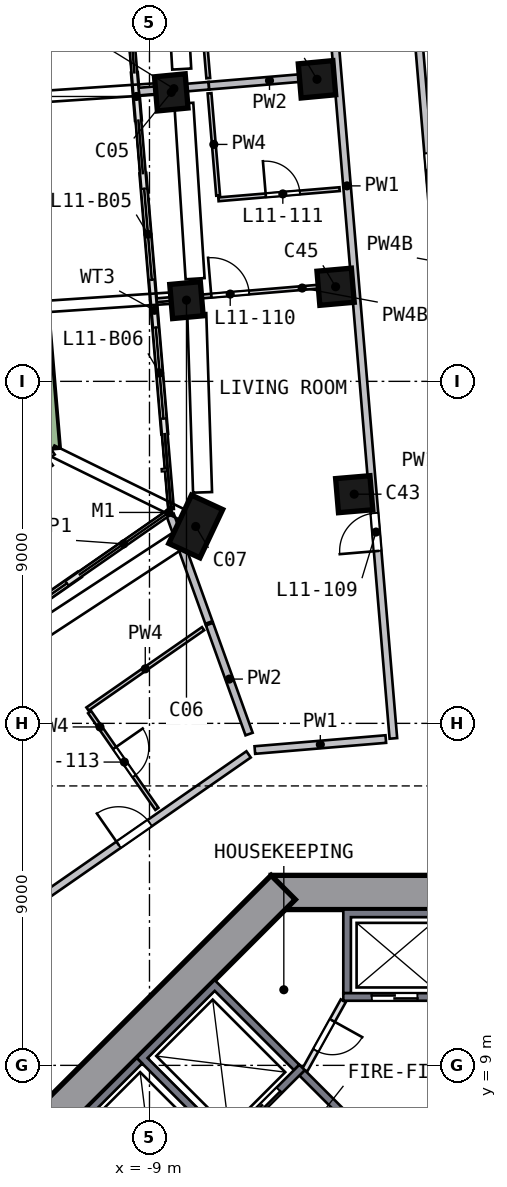
"""IFC4 building model, lengths in metres.
Left out: names, types, materials, properties, quantities, classifications, styles, units other than length and angle.
Written with IfcOpenShell. Run it as: python <this file> out.ifc"""

import sys

from ifc_helpers import new_model, si_unit, direction, frame, frame_2d, origin, origin_2d, place, context, subcontext, project, spatial, polyline, rectangle, outline, extrude, element, fill, save


model = new_model("IFC4")
c1 = context("Model", 3, precision=1e-05, world=origin(), true_north=direction((0.0, 1.0)))
c2 = subcontext(c1, "Body", "Model", "MODEL_VIEW")
j1 = project(units=[si_unit("LENGTHUNIT", "METRE"), si_unit("PLANEANGLEUNIT", "RADIAN")], contexts=[c1])
p1 = place(None, origin())
s1 = spatial("IfcSite", under=j1, at=p1, CompositionType="ELEMENT")
p2 = place(p1, origin())
s2 = spatial("IfcBuilding", under=s1, at=p2, CompositionType="ELEMENT")
p3 = place(p2, frame((0.0, 0.0, 53.0)))
s3 = spatial("IfcBuildingStorey", under=s2, at=p3, CompositionType="ELEMENT", Elevation=53.0)
p4 = place(p3, frame((-8.234, 34.713, 0.0), z_axis=(-0.158130165, -0.08896233, 0.98340254), x_axis=(0.096133876, -0.992588821, -0.074335123)))
e1 = element("IfcColumn", 1, at=p4, inside=s3, PredefinedType="COLUMN", context=c2, shape_type="SweptSolid", body=[
    extrude(rectangle(XDim=0.9, YDim=0.8, at=origin_2d()), origin(), (0.0, 0.0, 1.0), 3.244),
])
p5 = place(p3, frame((-7.862, 29.214, 0.0), z_axis=(-0.13553465, -0.062886261, 0.988774836), x_axis=(0.090521396, -0.994595555, -0.050848392)))
e2 = element("IfcColumn", 2, at=p5, inside=s3, PredefinedType="COLUMN", context=c2, shape_type="SweptSolid", body=[
    extrude(rectangle(XDim=0.9, YDim=0.8, at=origin_2d()), origin(), (0.0, 0.0, 1.0), 3.226),
])
p6 = place(p3, frame((-7.65, 23.226, 0.0), z_axis=(-0.110070907, -0.037323767, 0.9932227), x_axis=(0.417946894, 0.904913597, 0.080322951)))
e3 = element("IfcColumn", 3, at=p6, inside=s3, PredefinedType="COLUMN", context=c2, shape_type="SweptSolid", body=[
    extrude(rectangle(XDim=1.4, YDim=0.9, at=origin_2d()), origin(), (0.0, 0.0, 1.0), 3.212),
])
p7 = place(p3, frame((-3.475, 24.052, 0.0), z_axis=(-0.11418529, -0.017485098, 0.993305588), x_axis=(-0.084671563, 0.99637834, 0.007805781)))
e4 = element("IfcColumn", 4, at=p7, inside=s3, PredefinedType="COLUMN", context=c2, shape_type="SweptSolid", body=[
    extrude(rectangle(XDim=0.9, YDim=0.9, at=origin_2d()), origin(), (0.0, 0.0, 1.0), 3.211),
])
p8 = place(p3, frame((-3.936, 29.543, 0.0), z_axis=(-0.137379171, -0.044379379, 0.989523842), x_axis=(-0.088152159, 0.995579543, 0.03241249)))
e5 = element("IfcColumn", 5, at=p8, inside=s3, PredefinedType="COLUMN", context=c2, shape_type="SweptSolid", body=[
    extrude(rectangle(XDim=0.9, YDim=0.9, at=origin_2d()), origin(), (0.0, 0.0, 1.0), 3.224),
])
p9 = place(p3, frame((-0.862, 35.332, 0.0), z_axis=(-0.161759103, -0.054296762, 0.985335402), x_axis=(-0.089864726, 0.995147, 0.040084647)))
e6 = element("IfcColumn", 6, at=p9, inside=s3, PredefinedType="COLUMN", context=c2, shape_type="SweptSolid", body=[
    extrude(rectangle(XDim=0.9, YDim=0.9, at=origin_2d()), origin(), (0.0, 0.0, 1.0), 3.237),
])
p10 = place(p3, frame((-4.397, 35.035, 0.0), z_axis=(-0.159975814, -0.070907791, 0.984570883), x_axis=(-0.092819779, 0.99407797, 0.056510866)))
e7 = element("IfcColumn", 7, at=p10, inside=s3, PredefinedType="COLUMN", context=c2, shape_type="SweptSolid", body=[
    extrude(rectangle(XDim=0.9, YDim=0.9, at=origin_2d()), origin(), (0.0, 0.0, 1.0), 3.24),
])
p11 = place(p3, frame((5.799, 13.55, 0.0), z_axis=(0.0, 0.0, 1.0), x_axis=(-1.0, 0.0, 0.0)))
e8 = element("IfcWall", 8, at=p11, inside=s3, PredefinedType="SHEAR", context=c2, shape_type="SweptSolid", body=[
    extrude(rectangle(XDim=11.598, YDim=0.9, at=frame_2d((5.799, 0.0))), origin(), (0.0, 0.0, 1.0), 3.5),
])
p12 = place(p11, frame((4.899, 0.0, 0.0)))
e9 = element("IfcOpeningElement", 9, at=p12, cuts=e8, PredefinedType="OPENING", context=c2, shape_type="SweptSolid", body=[
    extrude(rectangle(XDim=1.8, YDim=2.1, at=frame_2d((0.9, 1.05))), frame((0.0, 0.46, 0.0), z_axis=(0.0, -1.0, 0.0), x_axis=(1.0, 0.0, 0.0)), (0.0, 0.0, 1.0), 0.92),
])
p13 = place(p3, frame((-5.481, 13.682, 0.0), z_axis=(0.0, 0.0, 1.0), x_axis=(-0.707106781, -0.707106781, 0.0)))
e10 = element("IfcWall", 10, at=p13, inside=s3, PredefinedType="SHEAR", context=c2, shape_type="SweptSolid", body=[
    extrude(rectangle(XDim=11.598, YDim=0.9, at=frame_2d((5.799, 0.0))), origin(), (0.0, 0.0, 1.0), 3.5),
])
p14 = place(p3, frame((-9.174, 32.465, 0.0), z_axis=(0.0, 0.0, 1.0), x_axis=(0.083666706, -0.996493794, 0.0)))
e11 = element("IfcWall", 11, at=p14, inside=s3, PredefinedType="SOLIDWALL", context=c2, shape_type="SweptSolid", body=[
    extrude(rectangle(XDim=3.35, YDim=0.15, at=frame_2d((1.675, 0.0))), origin(), (0.0, 0.0, 1.0), 2.425),
])
p15 = place(p14, frame((0.4, 0.0, 0.0)))
e12 = element("IfcOpeningElement", 12, at=p15, cuts=e11, PredefinedType="OPENING", context=c2, shape_type="SweptSolid", body=[
    extrude(rectangle(XDim=2.4, YDim=2.4, at=frame_2d((1.2, 1.2))), frame((0.0, 0.085, 0.0), z_axis=(0.0, -1.0, 0.0), x_axis=(1.0, 0.0, 0.0)), (0.0, 0.0, 1.0), 0.17),
])
p16 = place(p3, frame((-8.894, 29.127, 0.0), z_axis=(0.0, 0.0, 1.0), x_axis=(0.083677625, -0.996492878, 0.0)))
e13 = element("IfcWall", 13, at=p16, inside=s3, PredefinedType="SOLIDWALL", context=c2, shape_type="SweptSolid", body=[
    extrude(rectangle(XDim=3.516, YDim=0.15, at=frame_2d((1.758, 0.0))), origin(), (0.0, 0.0, 1.0), 2.425),
])
p17 = place(p16, frame((0.716, 0.0, 0.0)))
e14 = element("IfcOpeningElement", 14, at=p17, cuts=e13, PredefinedType="OPENING", context=c2, shape_type="SweptSolid", body=[
    extrude(rectangle(XDim=2.4, YDim=2.4, at=frame_2d((1.2, 1.2))), frame((0.0, 0.085, 0.0), z_axis=(0.0, -1.0, 0.0), x_axis=(1.0, 0.0, 0.0)), (0.0, 0.0, 1.0), 0.17),
])
p18 = place(p3, frame((-9.396, 35.117, 0.0), z_axis=(0.0, 0.0, 1.0), x_axis=(0.083776122, -0.996484602, 0.0)))
e15 = element("IfcWall", 15, at=p18, inside=s3, PredefinedType="SOLIDWALL", context=c2, shape_type="SweptSolid", body=[
    extrude(rectangle(XDim=1.244, YDim=0.15, at=frame_2d((0.622, 0.0))), origin(), (0.0, 0.0, 1.0), 2.425),
])
p19 = place(p3, frame((-10.846, 21.913, 0.0), z_axis=(0.0, 0.0, 1.0), x_axis=(-0.821158084, -0.570700799, 0.0)))
e16 = element("IfcWall", 16, at=p19, inside=s3, PredefinedType="SOLIDWALL", context=c2, shape_type="SweptSolid", body=[
    extrude(rectangle(XDim=3.6, YDim=0.15, at=frame_2d((1.8, 0.0))), origin(), (0.0, 0.0, 1.0), 2.425),
])
p20 = place(p19, frame((0.4, 0.0, 0.0)))
e17 = element("IfcOpeningElement", 17, at=p20, cuts=e16, PredefinedType="OPENING", context=c2, shape_type="SweptSolid", body=[
    extrude(rectangle(XDim=2.4, YDim=2.4, at=frame_2d((1.2, 1.2))), frame((0.0, 0.085, 0.0), z_axis=(0.0, -1.0, 0.0), x_axis=(1.0, 0.0, 0.0)), (0.0, 0.0, 1.0), 0.17),
])
p21 = place(p3, frame((-12.788, 39.359, 0.0), z_axis=(0.0, 0.0, 1.0), x_axis=(0.083680733, -0.996492617, 0.0)))
e18 = element("IfcWall", 18, at=p21, inside=s3, PredefinedType="SOLIDWALL", context=c2, shape_type="SweptSolid", body=[
    extrude(rectangle(XDim=14.185, YDim=0.5, at=frame_2d((7.093, 0.0))), origin(), (0.0, 0.0, 1.0), 0.7),
])
p22 = place(p3, origin())
e19 = element("IfcWall", 19, at=p22, inside=s3, PredefinedType="SOLIDWALL", context=c2, shape_type="SweptSolid", body=[
    extrude(outline(polyline([(-3.9, 10.9), (-3.9, 13.1), (-1.2, 13.1), (-1.2, 10.9), (-1.4, 10.9), (-1.4, 12.9), (-3.7, 12.9), (-3.7, 10.9), (-3.9, 10.9)])), origin(), (0.0, 0.0, 1.0), 3.19),
])
p23 = place(p3, frame((-1.2, 10.8, 0.0), z_axis=(0.0, 0.0, 1.0), x_axis=(-1.0, 0.0, 0.0)))
e20 = element("IfcWall", 20, at=p23, inside=s3, PredefinedType="SOLIDWALL", context=c2, shape_type="SweptSolid", body=[
    extrude(rectangle(XDim=2.7, YDim=0.2, at=frame_2d((1.35, 0.0))), origin(), (0.0, 0.0, 1.0), 3.19),
])
p24 = place(p23, frame((0.75, 0.0, 0.0)))
e21 = element("IfcOpeningElement", 21, at=p24, cuts=e20, PredefinedType="OPENING", context=c2, shape_type="SweptSolid", body=[
    extrude(rectangle(XDim=1.2, YDim=2.1, at=frame_2d((0.6, 1.05))), frame((0.0, 0.11, 0.0), z_axis=(0.0, -1.0, 0.0), x_axis=(1.0, 0.0, 0.0)), (0.0, 0.0, 1.0), 0.22),
])
p25 = place(p3, origin())
e22 = element("IfcWall", 22, at=p25, inside=s3, PredefinedType="SOLIDWALL", context=c2, shape_type="SweptSolid", body=[
    extrude(outline(polyline([(-9.334, 9.192), (-7.283, 11.243), (-5.056, 9.016), (-5.197, 8.874), (-7.283, 10.96), (-9.051, 9.192), (-6.965, 7.106), (-7.106, 6.965), (-9.334, 9.192)])), origin(), (0.0, 0.0, 1.0), 3.19),
])
p26 = place(p3, frame((-4.985, 8.945, 0.0), z_axis=(0.0, 0.0, 1.0), x_axis=(-0.707106781, -0.707106781, 0.0)))
e23 = element("IfcWall", 23, at=p26, inside=s3, PredefinedType="SOLIDWALL", context=c2, shape_type="SweptSolid", body=[
    extrude(rectangle(XDim=2.9, YDim=0.2, at=frame_2d((1.45, 0.0))), origin(), (0.0, 0.0, 1.0), 3.19),
])
p27 = place(p26, frame((0.85, 0.0, 0.0)))
e24 = element("IfcOpeningElement", 24, at=p27, cuts=e23, PredefinedType="OPENING", context=c2, shape_type="SweptSolid", body=[
    extrude(rectangle(XDim=1.2, YDim=2.1, at=frame_2d((0.6, 1.05))), frame((0.0, 0.11, 0.0), z_axis=(0.0, -1.0, 0.0), x_axis=(1.0, 0.0, 0.0)), (0.0, 0.0, 1.0), 0.22),
])
p28 = place(p3, origin())
e25 = element("IfcWall", 25, at=p28, inside=s3, PredefinedType="SOLIDWALL", context=c2, shape_type="SweptSolid", body=[
    extrude(outline(polyline([(-11.243, 7.283), (-9.334, 9.192), (-9.192, 9.051), (-10.96, 7.283), (-8.874, 5.197), (-9.016, 5.056), (-11.243, 7.283)])), origin(), (0.0, 0.0, 1.0), 3.19),
])
p29 = place(p3, frame((-3.005, 6.823, 0.0), z_axis=(0.0, 0.0, 1.0), x_axis=(-0.707106781, 0.707106781, 0.0)))
e26 = element("IfcWall", 26, at=p29, inside=s3, PredefinedType="SOLIDWALL", context=c2, shape_type="SweptSolid", body=[
    extrude(rectangle(XDim=2.8, YDim=0.2, at=frame_2d((1.4, 0.0))), origin(), (0.0, 0.0, 1.0), 3.19),
])
p30 = place(p3, frame((-3.9, 10.7, 0.0), z_axis=(0.0, 0.0, 1.0), x_axis=(-0.485692555, -0.874129705, 0.0)))
e27 = element("IfcWall", 27, at=p30, inside=s3, PredefinedType="PARTITIONING", context=c2, shape_type="SweptSolid", body=[
    extrude(rectangle(XDim=2.089, YDim=0.15, at=frame_2d((1.044, 0.0))), origin(), (0.0, 0.0, 1.0), 3.19),
])
p31 = place(p30, frame((0.594, 0.0, 0.0)))
e28 = element("IfcOpeningElement", 28, at=p31, cuts=e27, PredefinedType="OPENING", context=c2, shape_type="SweptSolid", body=[
    extrude(rectangle(XDim=0.9, YDim=2.1, at=frame_2d((0.45, 1.05))), frame((0.0, 0.085, 0.0), z_axis=(0.0, -1.0, 0.0), x_axis=(1.0, 0.0, 0.0)), (0.0, 0.0, 1.0), 0.17),
])
p32 = place(p3, frame((-14.042, 11.867, 0.0), z_axis=(0.0, 0.0, 1.0), x_axis=(0.821157773, 0.570701245, 0.0)))
e29 = element("IfcWall", 29, at=p32, inside=s3, PredefinedType="SOLIDWALL", context=c2, shape_type="SweptSolid", body=[
    extrude(rectangle(XDim=9.316, YDim=0.2, at=frame_2d((4.658, 0.0))), origin(), (0.0, 0.0, 1.0), 3.19),
])
p33 = place(p32, frame((5.15, 0.0, 0.0)))
e30 = element("IfcOpeningElement", 30, at=p33, cuts=e29, PredefinedType="OPENING", context=c2, shape_type="SweptSolid", body=[
    extrude(rectangle(XDim=1.0, YDim=2.1, at=frame_2d((0.5, 1.05))), frame((0.0, 0.11, 0.0), z_axis=(0.0, -1.0, 0.0), x_axis=(1.0, 0.0, 0.0)), (0.0, 0.0, 1.0), 0.22),
])
p34 = place(p3, frame((-2.781, 17.587, 0.0), z_axis=(0.0, 0.0, 1.0), x_axis=(-0.996488559, -0.083729042, 0.0)))
e31 = element("IfcWall", 31, at=p34, inside=s3, PredefinedType="SOLIDWALL", context=c2, shape_type="SweptSolid", body=[
    extrude(rectangle(XDim=3.458, YDim=0.2, at=frame_2d((1.729, 0.0))), origin(), (0.0, 0.0, 1.0), 3.19),
])
p35 = place(p3, frame((-2.582, 17.604, 0.0), z_axis=(0.0, 0.0, 1.0), x_axis=(-0.083684956, 0.996492262, 0.0)))
e32 = element("IfcWall", 32, at=p35, inside=s3, PredefinedType="SOLIDWALL", context=c2, shape_type="SweptSolid", body=[
    extrude(rectangle(XDim=23.033, YDim=0.2, at=frame_2d((11.516, 0.0))), origin(), (0.0, 0.0, 1.0), 3.19),
])
p36 = place(p35, frame((4.95, 0.0, 0.0)))
e33 = element("IfcOpeningElement", 33, at=p36, cuts=e32, PredefinedType="OPENING", context=c2, shape_type="SweptSolid", body=[
    extrude(rectangle(XDim=1.0, YDim=2.1, at=frame_2d((0.5, 1.05))), frame((0.0, 0.11, 0.0), z_axis=(0.0, -1.0, 0.0), x_axis=(1.0, 0.0, 0.0)), (0.0, 0.0, 1.0), 0.22),
])
p37 = place(p3, frame((-2.317, 40.74, 0.0), z_axis=(0.0, 0.0, 1.0), x_axis=(0.083679937, -0.996492683, 0.0)))
e34 = element("IfcWall", 34, at=p37, inside=s3, PredefinedType="SOLIDWALL", context=c2, shape_type="SweptSolid", body=[
    extrude(rectangle(XDim=22.833, YDim=0.2, at=frame_2d((11.417, 0.0))), origin(), (0.0, 0.0, 1.0), 3.19),
])
p38 = place(p37, frame((7.761, 0.0, 0.0)))
e35 = element("IfcOpeningElement", 35, at=p38, cuts=e34, PredefinedType="OPENING", context=c2, shape_type="SweptSolid", body=[
    extrude(rectangle(XDim=1.0, YDim=2.1, at=frame_2d((0.5, 1.05))), frame((0.0, 0.11, 0.0), z_axis=(0.0, -1.0, 0.0), x_axis=(1.0, 0.0, 0.0)), (0.0, 0.0, 1.0), 0.22),
])
p39 = place(p3, frame((-7.436, 34.78, 0.0), z_axis=(0.0, 0.0, 1.0), x_axis=(-0.996493687, -0.083667991, 0.0)))
e36 = element("IfcWall", 36, at=p39, inside=s3, PredefinedType="SOLIDWALL", context=c2, shape_type="SweptSolid", body=[
    extrude(rectangle(XDim=1.85, YDim=0.2, at=frame_2d((0.925, 0.0))), origin(), (0.0, 0.0, 1.0), 2.69),
])
p40 = place(p3, frame((-7.436, 20.655, 0.0), z_axis=(0.0, 0.0, 1.0), x_axis=(-0.338707985, 0.940891546, 0.0)))
e37 = element("IfcWall", 37, at=p40, inside=s3, PredefinedType="SOLIDWALL", context=c2, shape_type="SweptSolid", body=[
    extrude(rectangle(XDim=3.011, YDim=0.2, at=frame_2d((1.506, 0.0))), origin(), (0.0, 0.0, 1.0), 2.69),
])
p41 = place(p3, frame((-6.379, 17.719, 0.0), z_axis=(0.0, 0.0, 1.0), x_axis=(-0.338744775, 0.940878301, 0.0)))
e38 = element("IfcWall", 38, at=p41, inside=s3, PredefinedType="SOLIDWALL", context=c2, shape_type="SweptSolid", body=[
    extrude(rectangle(XDim=3.075, YDim=0.2, at=frame_2d((1.537, 0.0))), origin(), (0.0, 0.0, 1.0), 3.19),
])
p42 = place(p3, frame((-4.248, 35.048, 0.0), z_axis=(0.0, 0.0, 1.0), x_axis=(-0.99649135, -0.083695813, 0.0)))
e39 = element("IfcWall", 39, at=p42, inside=s3, PredefinedType="SOLIDWALL", context=c2, shape_type="SweptSolid", body=[
    extrude(rectangle(XDim=3.2, YDim=0.2, at=frame_2d((1.6, 0.0))), origin(), (0.0, 0.0, 1.0), 3.19),
])
p43 = place(p3, frame((-10.574, 18.295, 0.0), z_axis=(0.0, 0.0, 1.0), x_axis=(0.57075293, -0.82112185, 0.0)))
e40 = element("IfcWall", 40, at=p43, inside=s3, PredefinedType="PARTITIONING", context=c2, shape_type="SweptSolid", body=[
    extrude(rectangle(XDim=3.1, YDim=0.1, at=frame_2d((1.55, 0.0))), origin(), (0.0, 0.0, 1.0), 3.19),
])
p44 = place(p43, frame((1.15, 0.0, 0.0)))
e41 = element("IfcOpeningElement", 41, at=p44, cuts=e40, PredefinedType="OPENING", context=c2, shape_type="SweptSolid", body=[
    extrude(rectangle(XDim=0.9, YDim=2.1, at=frame_2d((0.45, 1.05))), frame((0.0, 0.06, 0.0), z_axis=(0.0, -1.0, 0.0), x_axis=(1.0, 0.0, 0.0)), (0.0, 0.0, 1.0), 0.12),
])
p45 = place(p3, frame((-10.632, 18.378, 0.0), z_axis=(0.0, 0.0, 1.0), x_axis=(0.821134863, 0.570734209, 0.0)))
e42 = element("IfcWall", 42, at=p45, inside=s3, PredefinedType="PARTITIONING", context=c2, shape_type="SweptSolid", body=[
    extrude(rectangle(XDim=3.704, YDim=0.1, at=frame_2d((1.852, 0.0))), origin(), (0.0, 0.0, 1.0), 3.19),
])
for number, where, z_axis, x_axis in (
    (43, (-7.679, 37.67, 0.0), (0.0, 0.0, 1.0), (0.084, -0.996, 0.0)),
    (44, (-7.42, 34.581, 0.0), (0.0, 0.0, 1.0), (0.084, -0.996, 0.0)),
):
    element("IfcWall", number, at=place(p3, frame(where, z_axis=z_axis, x_axis=x_axis)), inside=s3, PredefinedType="PARTITIONING", context=c2, shape_type="SweptSolid", body=[
        extrude(rectangle(XDim=2.7, YDim=0.1, at=frame_2d((1.35, 0.0))), origin(), (0.0, 0.0, 1.0), 3.19),
    ])
p46 = place(p3, frame((-8.819, 29.134, 0.0), z_axis=(0.0, 0.0, 1.0), x_axis=(0.996496237, 0.083637613, 0.0)))
e45 = element("IfcWall", 45, at=p46, inside=s3, PredefinedType="PARTITIONING", context=c2, shape_type="SweptSolid", body=[
    extrude(rectangle(XDim=5.05, YDim=0.1, at=frame_2d((2.525, 0.0))), origin(), (0.0, 0.0, 1.0), 2.69),
])
p47 = place(p46, frame((1.45, 0.0, 0.0)))
e46 = element("IfcOpeningElement", 46, at=p47, cuts=e45, PredefinedType="OPENING", context=c2, shape_type="SweptSolid", body=[
    extrude(rectangle(XDim=1.0, YDim=2.1, at=frame_2d((0.5, 1.05))), frame((0.0, 0.06, 0.0), z_axis=(0.0, -1.0, 0.0), x_axis=(1.0, 0.0, 0.0)), (0.0, 0.0, 1.0), 0.12),
])
p48 = place(p3, frame((-7.185, 31.79, 0.0), z_axis=(0.0, 0.0, 1.0), x_axis=(0.99649135, 0.083695813, 0.0)))
e47 = element("IfcWall", 47, at=p48, inside=s3, PredefinedType="PARTITIONING", context=c2, shape_type="SweptSolid", body=[
    extrude(rectangle(XDim=3.2, YDim=0.1, at=frame_2d((1.6, 0.0))), origin(), (0.0, 0.0, 1.0), 3.19),
])
p49 = place(p48, frame((1.25, 0.0, 0.0)))
e48 = element("IfcOpeningElement", 48, at=p49, cuts=e47, PredefinedType="OPENING", context=c2, shape_type="SweptSolid", body=[
    extrude(rectangle(XDim=0.9, YDim=2.1, at=frame_2d((0.45, 1.05))), frame((0.0, 0.06, 0.0), z_axis=(0.0, -1.0, 0.0), x_axis=(1.0, 0.0, 0.0)), (0.0, 0.0, 1.0), 0.12),
])
p50 = place(p15, origin())
e49 = element("IfcDoor", 49, at=p50, inside=s3, OperationType="SLIDING_TO_RIGHT", PredefinedType="DOOR", context=c2, shape_type="SweptSolid", body=[
    extrude(rectangle(XDim=2.4, YDim=2.4, at=frame_2d((1.2, 1.2))), frame((0.0, 0.025, 0.0), z_axis=(0.0, -1.0, 0.0), x_axis=(1.0, 0.0, 0.0)), (0.0, 0.0, 1.0), 0.05),
])
fill(e12, e49)
p51 = place(p17, origin())
e50 = element("IfcDoor", 50, at=p51, inside=s3, OperationType="SLIDING_TO_LEFT", PredefinedType="DOOR", context=c2, shape_type="SweptSolid", body=[
    extrude(rectangle(XDim=2.4, YDim=2.4, at=frame_2d((1.2, 1.2))), frame((0.0, 0.025, 0.0), z_axis=(0.0, -1.0, 0.0), x_axis=(1.0, 0.0, 0.0)), (0.0, 0.0, 1.0), 0.05),
])
fill(e14, e50)
p52 = place(p20, origin())
e51 = element("IfcDoor", 51, at=p52, inside=s3, OperationType="SLIDING_TO_RIGHT", PredefinedType="DOOR", context=c2, shape_type="SweptSolid", body=[
    extrude(rectangle(XDim=2.4, YDim=2.4, at=frame_2d((1.2, 1.2))), frame((0.0, 0.025, 0.0), z_axis=(0.0, -1.0, 0.0), x_axis=(1.0, 0.0, 0.0)), (0.0, 0.0, 1.0), 0.05),
])
fill(e17, e51)
p53 = place(p24, origin())
e52 = element("IfcDoor", 52, at=p53, inside=s3, OperationType="DOUBLE_DOOR_SLIDING", PredefinedType="DOOR", context=c2, shape_type="SweptSolid", body=[
    extrude(rectangle(XDim=1.2, YDim=2.1, at=frame_2d((0.6, 1.05))), frame((0.0, 0.025, 0.0), z_axis=(0.0, -1.0, 0.0), x_axis=(1.0, 0.0, 0.0)), (0.0, 0.0, 1.0), 0.05),
])
fill(e21, e52)
p54 = place(p27, origin())
e53 = element("IfcDoor", 53, at=p54, inside=s3, OperationType="DOUBLE_DOOR_SLIDING", PredefinedType="DOOR", context=c2, shape_type="SweptSolid", body=[
    extrude(rectangle(XDim=1.2, YDim=2.1, at=frame_2d((0.6, 1.05))), frame((0.0, 0.025, 0.0), z_axis=(0.0, -1.0, 0.0), x_axis=(1.0, 0.0, 0.0)), (0.0, 0.0, 1.0), 0.05),
])
fill(e24, e53)
p55 = place(p31, origin())
e54 = element("IfcDoor", 54, at=p55, inside=s3, OperationType="SINGLE_SWING_LEFT", PredefinedType="DOOR", context=c2, shape_type="SweptSolid", body=[
    extrude(rectangle(XDim=0.9, YDim=2.1, at=frame_2d((0.45, 1.05))), frame((0.0, 0.025, 0.0), z_axis=(0.0, -1.0, 0.0), x_axis=(1.0, 0.0, 0.0)), (0.0, 0.0, 1.0), 0.05),
])
fill(e28, e54)
p56 = place(p38, origin())
e55 = element("IfcDoor", 55, at=p56, inside=s3, OperationType="SINGLE_SWING_LEFT", PredefinedType="DOOR", context=c2, shape_type="SweptSolid", body=[
    extrude(rectangle(XDim=1.0, YDim=2.1, at=frame_2d((0.5, 1.05))), frame((0.0, 0.025, 0.0), z_axis=(0.0, -1.0, 0.0), x_axis=(1.0, 0.0, 0.0)), (0.0, 0.0, 1.0), 0.05),
])
fill(e35, e55)
p57 = place(p36, origin())
e56 = element("IfcDoor", 56, at=p57, inside=s3, OperationType="SINGLE_SWING_LEFT", PredefinedType="DOOR", context=c2, shape_type="SweptSolid", body=[
    extrude(rectangle(XDim=1.0, YDim=2.1, at=frame_2d((0.5, 1.05))), frame((0.0, 0.025, 0.0), z_axis=(0.0, -1.0, 0.0), x_axis=(1.0, 0.0, 0.0)), (0.0, 0.0, 1.0), 0.05),
])
fill(e33, e56)
p58 = place(p47, origin())
e57 = element("IfcDoor", 57, at=p58, inside=s3, OperationType="SINGLE_SWING_LEFT", PredefinedType="DOOR", context=c2, shape_type="SweptSolid", body=[
    extrude(rectangle(XDim=1.0, YDim=2.1, at=frame_2d((0.5, 1.05))), frame((0.0, 0.025, 0.0), z_axis=(0.0, -1.0, 0.0), x_axis=(1.0, 0.0, 0.0)), (0.0, 0.0, 1.0), 0.05),
])
fill(e46, e57)
p59 = place(p49, origin())
e58 = element("IfcDoor", 58, at=p59, inside=s3, OperationType="SINGLE_SWING_LEFT", PredefinedType="DOOR", context=c2, shape_type="SweptSolid", body=[
    extrude(rectangle(XDim=0.9, YDim=2.1, at=frame_2d((0.45, 1.05))), frame((0.0, 0.025, 0.0), z_axis=(0.0, -1.0, 0.0), x_axis=(1.0, 0.0, 0.0)), (0.0, 0.0, 1.0), 0.05),
])
fill(e48, e58)
p60 = place(p33, origin())
e59 = element("IfcDoor", 59, at=p60, inside=s3, OperationType="SINGLE_SWING_LEFT", PredefinedType="DOOR", context=c2, shape_type="SweptSolid", body=[
    extrude(rectangle(XDim=1.0, YDim=2.1, at=frame_2d((0.5, 1.05))), frame((0.0, 0.025, 0.0), z_axis=(0.0, -1.0, 0.0), x_axis=(1.0, 0.0, 0.0)), (0.0, 0.0, 1.0), 0.05),
])
fill(e30, e59)
p61 = place(p44, origin())
e60 = element("IfcDoor", 60, at=p61, inside=s3, OperationType="SINGLE_SWING_LEFT", PredefinedType="DOOR", context=c2, shape_type="SweptSolid", body=[
    extrude(rectangle(XDim=0.9, YDim=2.1, at=frame_2d((0.45, 1.05))), frame((0.0, 0.025, 0.0), z_axis=(0.0, -1.0, 0.0), x_axis=(1.0, 0.0, 0.0)), (0.0, 0.0, 1.0), 0.05),
])
fill(e41, e60)
save(model, sys.argv[1])
